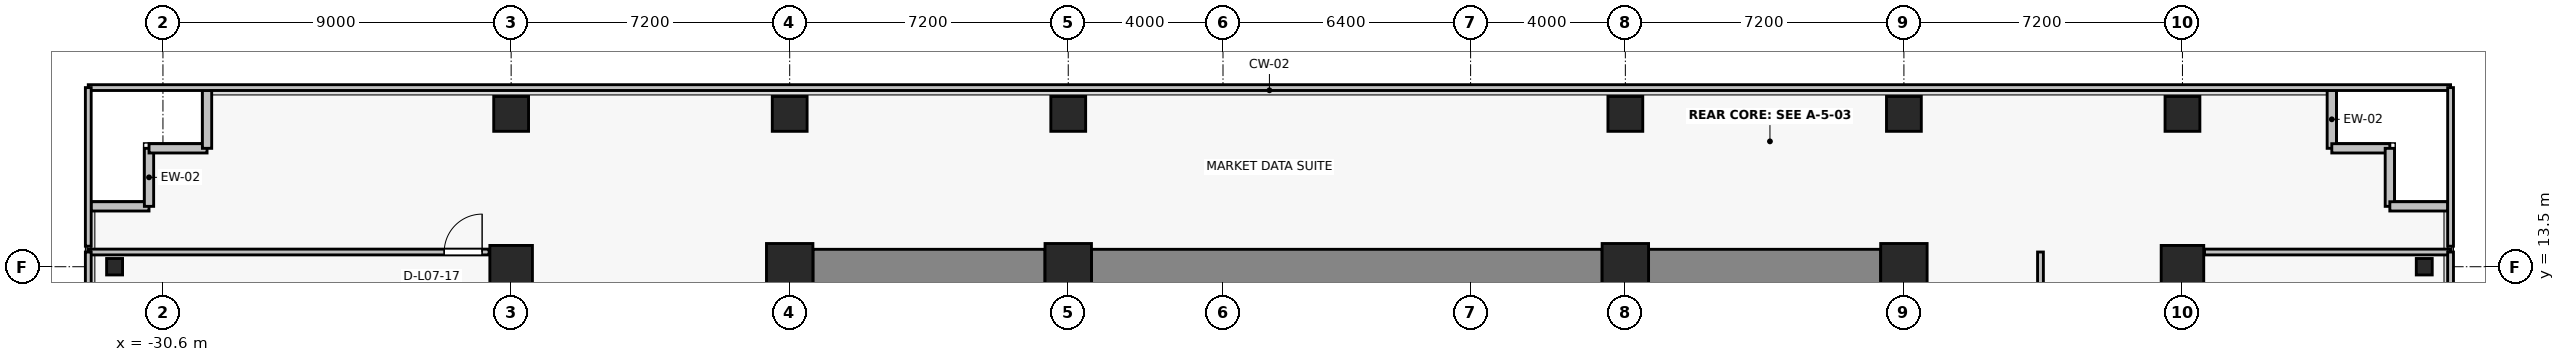
"""IFC4 building model, lengths in metres.
Left out: names, types, materials, properties, quantities, classifications, styles, units other than length and angle.
Written with IfcOpenShell. Run it as: python <this file> out.ifc"""

import sys

from ifc_helpers import new_model, si_unit, direction, frame, frame_2d, origin, origin_2d, place, context, subcontext, project, spatial, rectangle, i_section, extrude, source, transform, mapped, element, fill, save


model = new_model("IFC4")
c1 = context("Model", 3, precision=1e-05, world=origin(), true_north=direction((0.0, 1.0)))
c2 = subcontext(c1, "Body", "Model", "MODEL_VIEW")
j1 = project(units=[si_unit("LENGTHUNIT", "METRE"), si_unit("PLANEANGLEUNIT", "RADIAN")], contexts=[c1])
p1 = place(None, origin())
s1 = spatial("IfcSite", under=j1, at=p1, CompositionType="ELEMENT")
p2 = place(p1, origin())
s2 = spatial("IfcBuilding", under=s1, at=p2, CompositionType="ELEMENT")
p3 = place(p2, frame((0.0, 0.0, 30.7)))
s3 = spatial("IfcBuildingStorey", under=s2, at=p3, CompositionType="ELEMENT", Elevation=30.7)
for number, where, z_axis, x_axis in (
    (1, (-14.4, 13.5, 0.0), (0.0, 0.0, 1.0), (1.0, 0.0, 0.0)),
    (2, (-7.2, 13.5, 0.0), (0.0, 0.0, 1.0), (1.0, 0.0, 0.0)),
    (3, (7.2, 13.5, 0.0), (0.0, 0.0, 1.0), (1.0, 0.0, 0.0)),
    (4, (14.4, 13.5, 0.0), (0.0, 0.0, 1.0), (1.0, 0.0, 0.0)),
):
    element("IfcColumn", number, at=place(p3, frame(where, z_axis=z_axis, x_axis=x_axis)), inside=s3, PredefinedType="COLUMN", context=c2, shape_type="SweptSolid", body=[
        extrude(rectangle(XDim=1.2, YDim=1.2, at=origin_2d()), origin(), (0.0, 0.0, 1.0), 3.3),
    ])
for number, where, z_axis, x_axis in (
    (5, (-21.6, 13.5, 0.0), (0.0, 0.0, 1.0), (1.0, 0.0, 0.0)),
    (6, (21.6, 13.5, 0.0), (0.0, 0.0, 1.0), (1.0, 0.0, 0.0)),
):
    element("IfcColumn", number, at=place(p3, frame(where, z_axis=z_axis, x_axis=x_axis)), inside=s3, PredefinedType="COLUMN", context=c2, shape_type="SweptSolid", body=[
        extrude(rectangle(XDim=1.1, YDim=1.1, at=origin_2d()), origin(), (0.0, 0.0, 1.0), 3.3),
    ])
for number, where, z_axis, x_axis in (
    (7, (-14.4, 17.45, 0.0), (0.0, 0.0, 1.0), (1.0, 0.0, 0.0)),
    (8, (-7.2, 17.45, 0.0), (0.0, 0.0, 1.0), (1.0, 0.0, 0.0)),
    (9, (7.2, 17.45, 0.0), (0.0, 0.0, 1.0), (1.0, 0.0, 0.0)),
    (10, (14.4, 17.45, 0.0), (0.0, 0.0, 1.0), (1.0, 0.0, 0.0)),
    (11, (-21.6, 17.45, 0.0), (0.0, 0.0, 1.0), (1.0, 0.0, 0.0)),
    (12, (21.6, 17.45, 0.0), (0.0, 0.0, 1.0), (1.0, 0.0, 0.0)),
):
    element("IfcColumn", number, at=place(p3, frame(where, z_axis=z_axis, x_axis=x_axis)), inside=s3, PredefinedType="COLUMN", context=c2, shape_type="SweptSolid", body=[
        extrude(rectangle(XDim=0.9, YDim=0.9, at=origin_2d()), origin(), (0.0, 0.0, 1.0), 3.3),
    ])
for number, where, z_axis, x_axis in (
    (13, (-31.85, 13.5, 0.0), (0.0, 0.0, 1.0), (1.0, 0.0, 0.0)),
    (14, (27.85, 13.5, 0.0), (0.0, 0.0, 1.0), (1.0, 0.0, 0.0)),
):
    element("IfcColumn", number, at=place(p3, frame(where, z_axis=z_axis, x_axis=x_axis)), inside=s3, PredefinedType="COLUMN", context=c2, shape_type="SweptSolid", body=[
        extrude(i_section(OverallWidth=0.412, OverallDepth=0.425, WebThickness=0.026, FlangeThickness=0.039, FilletRadius=0.015, at=origin_2d()), origin(), (0.0, 0.0, 1.0), 3.3),
    ])
p4 = place(p3, frame((-13.8, 13.5, 0.0), z_axis=(0.0, 0.0, 1.0), x_axis=(1.0, 0.0, 0.0)))
e15 = element("IfcWall", 15, at=p4, inside=s3, PredefinedType="SHEAR", context=c2, shape_type="SweptSolid", body=[
    extrude(rectangle(XDim=6.0, YDim=0.9, at=frame_2d((3.0, 0.0))), origin(), (0.0, 0.0, 1.0), 3.075),
])
p5 = place(p3, frame((-6.6, 13.5, 0.0), z_axis=(0.0, 0.0, 1.0), x_axis=(1.0, 0.0, 0.0)))
e16 = element("IfcWall", 16, at=p5, inside=s3, PredefinedType="SHEAR", context=c2, shape_type="SweptSolid", body=[
    extrude(rectangle(XDim=13.2, YDim=0.9, at=frame_2d((6.6, 0.0))), origin(), (0.0, 0.0, 1.0), 3.075),
])
p6 = place(p3, frame((7.8, 13.5, 0.0), z_axis=(0.0, 0.0, 1.0), x_axis=(1.0, 0.0, 0.0)))
e17 = element("IfcWall", 17, at=p6, inside=s3, PredefinedType="SHEAR", context=c2, shape_type="SweptSolid", body=[
    extrude(rectangle(XDim=6.0, YDim=0.9, at=frame_2d((3.0, 0.0))), origin(), (0.0, 0.0, 1.0), 3.075),
])
for number, where, z_axis, x_axis in (
    (18, (-30.96, 15.06, 0.0), (0.0, 0.0, 1.0), (-1.0, 0.0, 0.0)),
    (19, (-30.96, 16.56, 0.0), (0.0, 0.0, 1.0), (0.0, -1.0, 0.0)),
    (20, (-29.46, 16.56, 0.0), (0.0, 0.0, 1.0), (-1.0, 0.0, 0.0)),
    (21, (-29.46, 18.06, 0.0), (0.0, 0.0, 1.0), (0.0, -1.0, 0.0)),
    (22, (25.46, 16.56, 0.0), (0.0, 0.0, 1.0), (0.0, 1.0, 0.0)),
    (23, (26.96, 16.56, 0.0), (0.0, 0.0, 1.0), (-1.0, 0.0, 0.0)),
    (24, (26.96, 15.06, 0.0), (0.0, 0.0, 1.0), (0.0, 1.0, 0.0)),
    (25, (28.46, 15.06, 0.0), (0.0, 0.0, 1.0), (-1.0, 0.0, 0.0)),
):
    element("IfcWall", number, at=place(p3, frame(where, z_axis=z_axis, x_axis=x_axis)), inside=s3, PredefinedType="SOLIDWALL", context=c2, shape_type="SweptSolid", body=[
        extrude(rectangle(XDim=1.5, YDim=0.24, at=frame_2d((0.75, 0.0))), origin(), (0.0, 0.0, 1.0), 3.075),
    ])
p7 = place(p3, frame((-32.53, 13.88, 0.0), z_axis=(0.0, 0.0, 1.0), x_axis=(1.0, 0.0, 0.0)))
e26 = element("IfcWall", 26, at=p7, inside=s3, PredefinedType="PARTITIONING", context=c2, shape_type="SweptSolid", body=[
    extrude(rectangle(XDim=10.36, YDim=0.15, at=frame_2d((5.18, 0.0))), origin(), (0.0, 0.0, 1.0), 3.075),
])
p8 = place(p7, frame((9.2, 0.0, 0.0)))
e27 = element("IfcOpeningElement", 27, at=p8, cuts=e26, PredefinedType="OPENING", context=c2, shape_type="SweptSolid", body=[
    extrude(rectangle(XDim=0.98, YDim=2.15, at=frame_2d((0.49, 1.075))), frame((0.0, 0.085, 0.0), z_axis=(0.0, -1.0, 0.0), x_axis=(1.0, 0.0, 0.0)), (0.0, 0.0, 1.0), 0.17),
])
p9 = place(p3, frame((-32.53, -1.77, 0.0), z_axis=(0.0, 0.0, 1.0), x_axis=(0.0, 1.0, 0.0)))
e28 = element("IfcWall", 28, at=p9, inside=s3, PredefinedType="PARTITIONING", context=c2, shape_type="SweptSolid", body=[
    extrude(rectangle(XDim=15.65, YDim=0.15, at=frame_2d((7.825, 0.0))), origin(), (0.0, 0.0, 1.0), 3.075),
])
p10 = place(p3, frame((22.17, 13.88, 0.0), z_axis=(0.0, 0.0, 1.0), x_axis=(1.0, 0.0, 0.0)))
e29 = element("IfcWall", 29, at=p10, inside=s3, PredefinedType="PARTITIONING", context=c2, shape_type="SweptSolid", body=[
    extrude(rectangle(XDim=6.36, YDim=0.15, at=frame_2d((3.18, 0.0))), origin(), (0.0, 0.0, 1.0), 3.075),
])
p11 = place(p3, frame((17.93, 4.522, 0.0), z_axis=(0.0, 0.0, 1.0), x_axis=(0.0, 1.0, 0.0)))
e30 = element("IfcWall", 30, at=p11, inside=s3, PredefinedType="PARTITIONING", context=c2, shape_type="SweptSolid", body=[
    extrude(rectangle(XDim=9.358, YDim=0.15, at=frame_2d((4.679, 0.0))), origin(), (0.0, 0.0, 1.0), 2.465),
])
p12 = place(p11, frame((4.189, 0.0, 0.0)))
e31 = element("IfcOpeningElement", 31, at=p12, cuts=e30, PredefinedType="OPENING", context=c2, shape_type="SweptSolid", body=[
    extrude(rectangle(XDim=0.98, YDim=2.15, at=frame_2d((0.49, 1.075))), frame((0.0, 0.085, 0.0), z_axis=(0.0, -1.0, 0.0), x_axis=(1.0, 0.0, 0.0)), (0.0, 0.0, 1.0), 0.17),
])
p13 = place(p3, frame((28.53, 13.88, 0.0), z_axis=(0.0, 0.0, 1.0), x_axis=(0.0, -1.0, 0.0)))
e32 = element("IfcWall", 32, at=p13, inside=s3, PredefinedType="PARTITIONING", context=c2, shape_type="SweptSolid", body=[
    extrude(rectangle(XDim=9.358, YDim=0.15, at=frame_2d((4.679, 0.0))), origin(), (0.0, 0.0, 1.0), 3.075),
])
p14 = place(p3, frame((-32.53, 18.13, 0.0), z_axis=(0.0, 0.0, 1.0), x_axis=(1.0, 0.0, 0.0)))
e33 = element("IfcWall", 33, at=p14, inside=s3, PredefinedType="PARTITIONING", context=c2, shape_type="SweptSolid", body=[
    extrude(rectangle(XDim=61.06, YDim=0.15, at=frame_2d((30.53, 0.0))), origin(), (0.0, 0.0, 1.0), 3.075),
])
for number, where, z_axis, x_axis in (
    (34, (-32.53, 14.03, 0.0), (0.0, 0.0, 1.0), (0.0, 1.0, 0.0)),
    (35, (28.53, 18.13, 0.0), (0.0, 0.0, 1.0), (0.0, -1.0, 0.0)),
):
    element("IfcWall", number, at=place(p3, frame(where, z_axis=z_axis, x_axis=x_axis)), inside=s3, PredefinedType="PARTITIONING", context=c2, shape_type="SweptSolid", body=[
        extrude(rectangle(XDim=4.1, YDim=0.15, at=frame_2d((2.05, 0.0))), origin(), (0.0, 0.0, 1.0), 3.075),
    ])
m1 = source(origin(), c2, "Body", "SweptSolid", [
    extrude(rectangle(XDim=0.98, YDim=2.15, at=frame_2d((0.49, 1.075))), frame((0.0, 0.025, 0.0), z_axis=(0.0, -1.0, 0.0), x_axis=(1.0, 0.0, 0.0)), (0.0, 0.0, 1.0), 0.05),
])
p15 = place(p8, origin())
e36 = element("IfcDoor", 36, at=p15, inside=s3, OperationType="SINGLE_SWING_RIGHT", PredefinedType="DOOR", context=c2, shape_type="MappedRepresentation", body=[
    mapped(m1, transform((0.0, 0.0, 0.0), x_axis=(1.0, 0.0, 0.0), y_axis=(0.0, 1.0, 0.0), z_axis=(0.0, 0.0, 1.0), scale=1.0)),
])
fill(e27, e36)
save(model, sys.argv[1])
